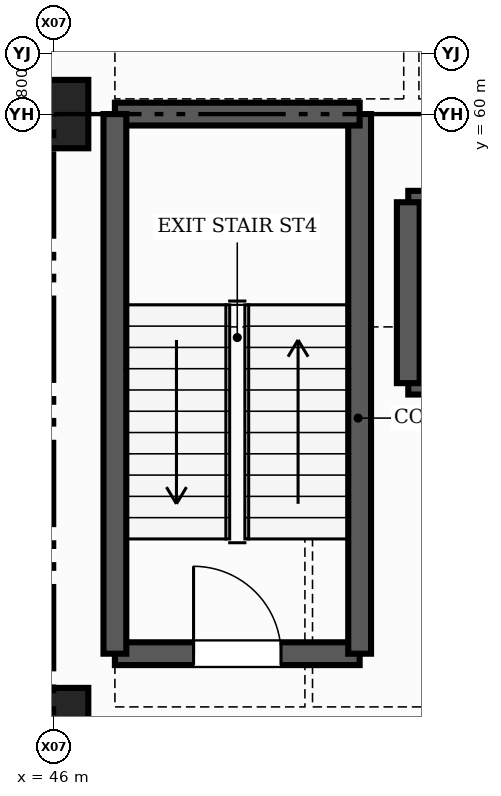
"""IFC4 building model, lengths in metres.
Left out: names, types, materials, properties, quantities, classifications, styles, units other than length and angle.
Written with IfcOpenShell. Run it as: python <this file> out.ifc"""

import sys

from ifc_helpers import new_model, si_unit, direction, frame, frame_2d, origin, origin_2d, place, context, subcontext, project, spatial, rectangle, extrude, element, fill, save


model = new_model("IFC4")
c1 = context("Model", 3, precision=1e-05, world=origin(), true_north=direction((0.0, 1.0)))
c2 = subcontext(c1, "Body", "Model", "MODEL_VIEW")
j1 = project(units=[si_unit("LENGTHUNIT", "METRE"), si_unit("PLANEANGLEUNIT", "RADIAN")], contexts=[c1])
p1 = place(None, origin())
s1 = spatial("IfcSite", under=j1, at=p1, CompositionType="ELEMENT")
p2 = place(p1, origin())
s2 = spatial("IfcBuilding", under=s1, at=p2, CompositionType="ELEMENT")
p3 = place(p2, frame((0.0, 0.0, -4.2)))
s3 = spatial("IfcBuildingStorey", under=s2, at=p3, CompositionType="ELEMENT", Elevation=-4.2)
for number, where, z_axis, x_axis in (
    (1, (46.0, 52.0, -0.52), (0.0, 0.0, 1.0), (1.0, 0.0, 0.0)),
    (2, (46.0, 60.0, -0.52), (0.0, 0.0, 1.0), (1.0, 0.0, 0.0)),
):
    element("IfcColumn", number, at=place(p3, frame(where, z_axis=z_axis, x_axis=x_axis)), inside=s3, PredefinedType="COLUMN", context=c2, shape_type="SweptSolid", body=[
        extrude(rectangle(XDim=0.9, YDim=0.9, at=origin_2d()), origin(), (0.0, 0.0, 1.0), 4.72),
    ])
p4 = place(p3, frame((46.8, 52.9, -0.52), z_axis=(0.0, 0.0, 1.0), x_axis=(1.0, 0.0, 0.0)))
e3 = element("IfcWall", 3, at=p4, inside=s3, PredefinedType="SHEAR", context=c2, shape_type="SweptSolid", body=[
    extrude(rectangle(XDim=3.22, YDim=0.3, at=frame_2d((1.61, 0.0))), origin(), (0.0, 0.0, 1.0), 4.72),
])
p5 = place(p4, frame((1.035, 0.0, 0.52)))
e4 = element("IfcOpeningElement", 4, at=p5, cuts=e3, PredefinedType="OPENING", context=c2, shape_type="SweptSolid", body=[
    extrude(rectangle(XDim=1.15, YDim=2.15, at=frame_2d((0.575, 1.075))), frame((0.0, 0.16, 0.0), z_axis=(0.0, -1.0, 0.0), x_axis=(1.0, 0.0, 0.0)), (0.0, 0.0, 1.0), 0.32),
])
p6 = place(p3, frame((50.02, 52.9, -0.52), z_axis=(0.0, 0.0, 1.0), x_axis=(0.0, 1.0, 0.0)))
e5 = element("IfcWall", 5, at=p6, inside=s3, PredefinedType="SHEAR", context=c2, shape_type="SweptSolid", body=[
    extrude(rectangle(XDim=7.1, YDim=0.3, at=frame_2d((3.55, 0.0))), origin(), (0.0, 0.0, 1.0), 4.72),
])
p7 = place(p3, frame((50.02, 60.0, -0.52), z_axis=(0.0, 0.0, 1.0), x_axis=(-1.0, 0.0, 0.0)))
e6 = element("IfcWall", 6, at=p7, inside=s3, PredefinedType="SHEAR", context=c2, shape_type="SweptSolid", body=[
    extrude(rectangle(XDim=3.22, YDim=0.3, at=frame_2d((1.61, 0.0))), origin(), (0.0, 0.0, 1.0), 4.72),
])
p8 = place(p3, frame((46.8, 60.0, -0.52), z_axis=(0.0, 0.0, 1.0), x_axis=(0.0, -1.0, 0.0)))
e7 = element("IfcWall", 7, at=p8, inside=s3, PredefinedType="SHEAR", context=c2, shape_type="SweptSolid", body=[
    extrude(rectangle(XDim=7.1, YDim=0.3, at=frame_2d((3.55, 0.0))), origin(), (0.0, 0.0, 1.0), 4.72),
])
for number, where, z_axis, x_axis in (
    (8, (50.66, 56.46, -0.52), (0.0, 0.0, 1.0), (1.0, 0.0, 0.0)),
    (9, (52.54, 58.84, -0.52), (0.0, 0.0, 1.0), (-1.0, 0.0, 0.0)),
):
    element("IfcWall", number, at=place(p3, frame(where, z_axis=z_axis, x_axis=x_axis)), inside=s3, PredefinedType="SHEAR", context=c2, shape_type="SweptSolid", body=[
        extrude(rectangle(XDim=1.88, YDim=0.3, at=frame_2d((0.94, 0.0))), origin(), (0.0, 0.0, 1.0), 4.22),
    ])
p9 = place(p3, frame((50.66, 58.84, -0.52), z_axis=(0.0, 0.0, 1.0), x_axis=(0.0, -1.0, 0.0)))
e10 = element("IfcWall", 10, at=p9, inside=s3, PredefinedType="SHEAR", context=c2, shape_type="SweptSolid", body=[
    extrude(rectangle(XDim=2.38, YDim=0.3, at=frame_2d((1.19, 0.0))), origin(), (0.0, 0.0, 1.0), 4.22),
])
p10 = place(p5, origin())
e11 = element("IfcDoor", 11, at=p10, inside=s3, OperationType="SINGLE_SWING_LEFT", PredefinedType="DOOR", context=c2, shape_type="SweptSolid", body=[
    extrude(rectangle(XDim=1.15, YDim=2.15, at=frame_2d((0.575, 1.075))), frame((0.0, 0.025, 0.0), z_axis=(0.0, -1.0, 0.0), x_axis=(1.0, 0.0, 0.0)), (0.0, 0.0, 1.0), 0.05),
])
fill(e4, e11)
save(model, sys.argv[1])
